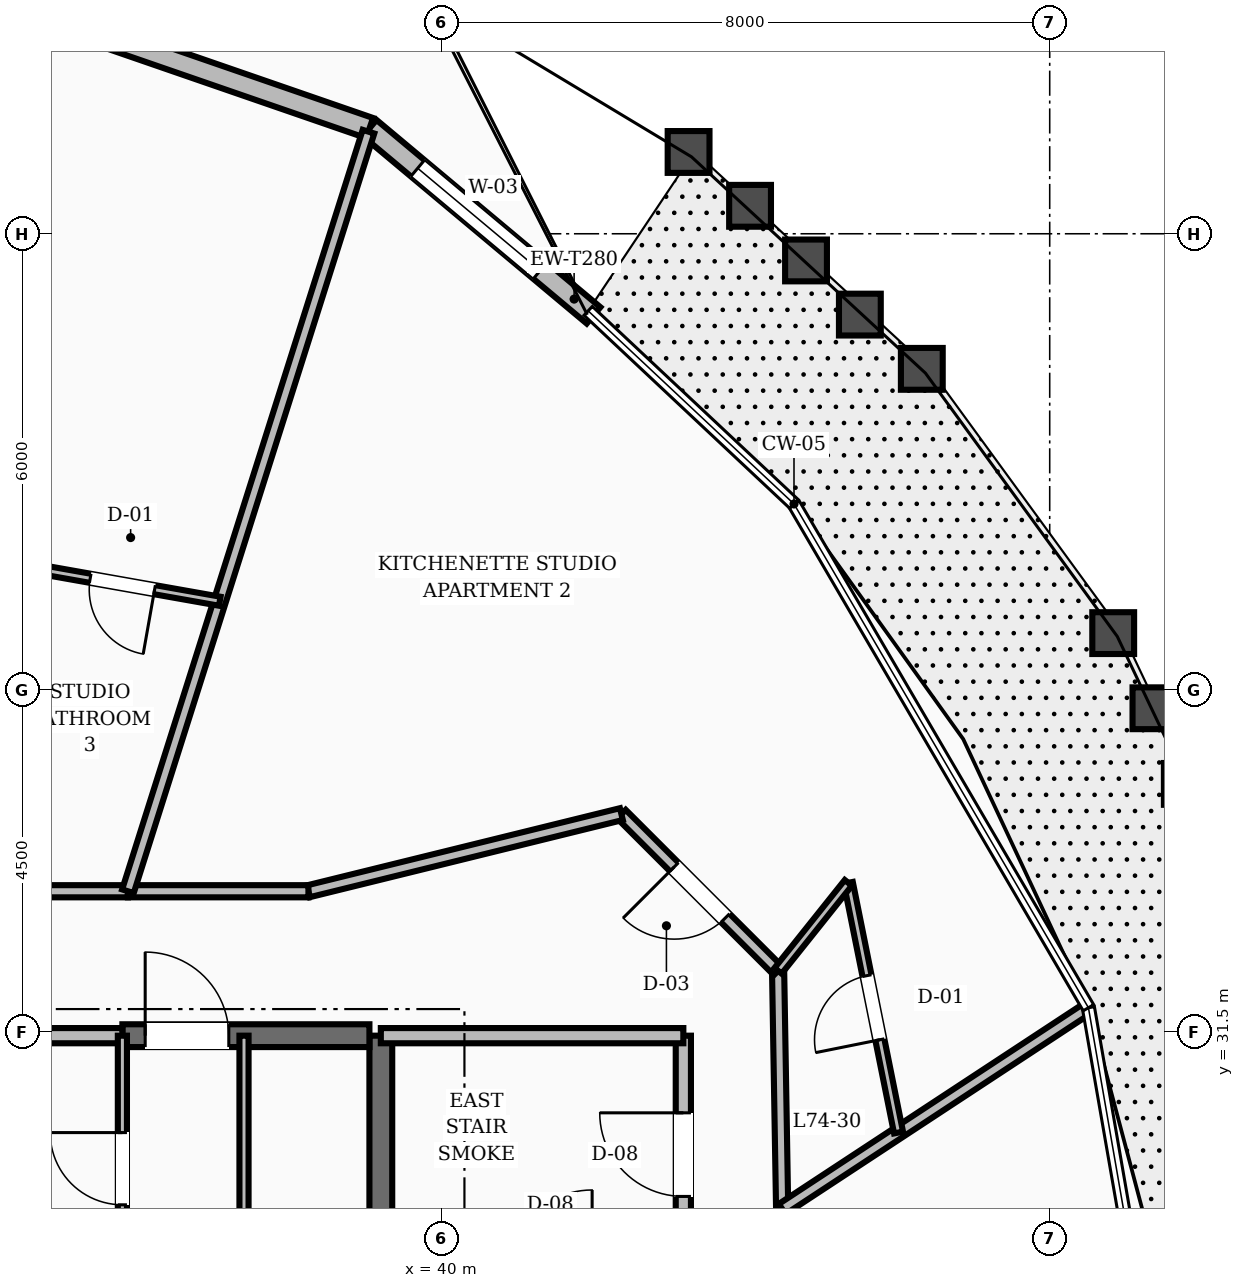
"""IFC4 building model, lengths in metres.
Left out: names, types, materials, properties, quantities, classifications, styles, units other than length and angle.
Written with IfcOpenShell. Run it as: python <this file> out.ifc"""

import sys

from ifc_helpers import new_model, si_unit, direction, frame, frame_2d, origin, place, context, subcontext, project, spatial, rectangle, extrude, element, fill, save


model = new_model("IFC4")
c1 = context("Model", 3, precision=1e-05, world=origin(), true_north=direction((0.0, 1.0)))
c2 = subcontext(c1, "Body", "Model", "MODEL_VIEW")
j1 = project(units=[si_unit("LENGTHUNIT", "METRE"), si_unit("PLANEANGLEUNIT", "RADIAN")], contexts=[c1])
p1 = place(None, origin())
s1 = spatial("IfcSite", under=j1, at=p1, CompositionType="ELEMENT")
p2 = place(p1, origin())
s2 = spatial("IfcBuilding", under=s1, at=p2, CompositionType="ELEMENT")
p3 = place(p2, frame((0.0, 0.0, 283.2)))
s3 = spatial("IfcBuildingStorey", under=s2, at=p3, CompositionType="ELEMENT", Elevation=283.2)
p4 = place(p3, frame((39.2, 25.15, 0.0), z_axis=(0.0, 0.0, 1.0), x_axis=(0.0, 1.0, 0.0)))
e1 = element("IfcWall", 1, at=p4, inside=s3, PredefinedType="SHEAR", context=c2, shape_type="SweptSolid", body=[
    extrude(rectangle(XDim=6.3, YDim=0.3, at=frame_2d((3.15, 0.0))), origin(), (0.0, 0.0, 1.0), 3.6),
])
p5 = place(p3, frame((35.8, 31.45, 0.0), z_axis=(0.0, 0.0, 1.0), x_axis=(1.0, 0.0, 0.0)))
e2 = element("IfcWall", 2, at=p5, inside=s3, PredefinedType="SHEAR", context=c2, shape_type="SweptSolid", body=[
    extrude(rectangle(XDim=3.25, YDim=0.3, at=frame_2d((1.625, 0.0))), origin(), (0.0, 0.0, 1.0), 3.6),
])
p6 = place(p5, frame((0.3, 0.0, 0.0)))
e3 = element("IfcOpeningElement", 3, at=p6, cuts=e2, PredefinedType="OPENING", context=c2, shape_type="SweptSolid", body=[
    extrude(rectangle(XDim=1.1, YDim=2.1, at=frame_2d((0.55, 1.05))), frame((0.0, 0.16, 0.0), z_axis=(0.0, -1.0, 0.0), x_axis=(1.0, 0.0, 0.0)), (0.0, 0.0, 1.0), 0.32),
])
p7 = place(p3, frame((41.999, 40.927, 0.0), z_axis=(0.0, 0.0, 1.0), x_axis=(-0.767031932992, 0.641608925882, 0.0)))
e4 = element("IfcWall", 4, at=p7, inside=s3, PredefinedType="STANDARD", context=c2, shape_type="SweptSolid", body=[
    extrude(rectangle(XDim=3.841, YDim=0.28, at=frame_2d((1.92, 0.0))), origin(), (0.0, 0.0, 1.0), 2.88),
])
p8 = place(p7, frame((0.916, 0.0, 0.8)))
e5 = element("IfcOpeningElement", 5, at=p8, cuts=e4, PredefinedType="OPENING", context=c2, shape_type="SweptSolid", body=[
    extrude(rectangle(XDim=2.1, YDim=1.65, at=frame_2d((1.05, 0.825))), frame((0.0, 0.15, 0.0), z_axis=(0.0, -1.0, 0.0), x_axis=(1.0, 0.0, 0.0)), (0.0, 0.0, 1.0), 0.3),
])
p9 = place(p3, frame((39.053, 43.391, 0.0), z_axis=(0.0, 0.0, 1.0), x_axis=(-0.945189830933, 0.326521336976, 0.0)))
e6 = element("IfcWall", 6, at=p9, inside=s3, PredefinedType="STANDARD", context=c2, shape_type="SweptSolid", body=[
    extrude(rectangle(XDim=3.658, YDim=0.28, at=frame_2d((1.829, 0.0))), origin(), (0.0, 0.0, 1.0), 2.88),
])
p10 = place(p3, frame((43.18, 28.32, 0.0), z_axis=(0.0, 0.0, 1.0), x_axis=(0.0, 1.0, 0.0)))
e7 = element("IfcWall", 7, at=p10, inside=s3, PredefinedType="SOLIDWALL", context=c2, shape_type="SweptSolid", body=[
    extrude(rectangle(XDim=3.13, YDim=0.2, at=frame_2d((1.565, 0.0))), origin(), (0.0, 0.0, 1.0), 2.87),
])
p11 = place(p10, frame((1.015, 0.0, 0.0)))
e8 = element("IfcOpeningElement", 8, at=p11, cuts=e7, PredefinedType="OPENING", context=c2, shape_type="SweptSolid", body=[
    extrude(rectangle(XDim=1.1, YDim=2.1, at=frame_2d((0.55, 1.05))), frame((0.0, 0.11, 0.0), z_axis=(0.0, -1.0, 0.0), x_axis=(1.0, 0.0, 0.0)), (0.0, 0.0, 1.0), 0.22),
])
p12 = place(p3, frame((39.2, 31.45, 0.0), z_axis=(0.0, 0.0, 1.0), x_axis=(1.0, 0.0, 0.0)))
e9 = element("IfcWall", 9, at=p12, inside=s3, PredefinedType="SOLIDWALL", context=c2, shape_type="SweptSolid", body=[
    extrude(rectangle(XDim=3.98, YDim=0.2, at=frame_2d((1.99, 0.0))), origin(), (0.0, 0.0, 1.0), 2.87),
])
p13 = place(p3, frame((28.2, 31.45, 0.0), z_axis=(0.0, 0.0, 1.0), x_axis=(1.0, 0.0, 0.0)))
e10 = element("IfcWall", 10, at=p13, inside=s3, PredefinedType="SOLIDWALL", context=c2, shape_type="SweptSolid", body=[
    extrude(rectangle(XDim=7.6, YDim=0.2, at=frame_2d((3.8, 0.0))), origin(), (0.0, 0.0, 1.0), 2.87),
])
p14 = place(p13, frame((1.0, 0.0, 0.0)))
e11 = element("IfcOpeningElement", 11, at=p14, cuts=e10, PredefinedType="OPENING", context=c2, shape_type="SweptSolid", body=[
    extrude(rectangle(XDim=0.95, YDim=2.1, at=frame_2d((0.475, 1.05))), frame((0.0, 0.11, 0.0), z_axis=(0.0, -1.0, 0.0), x_axis=(1.0, 0.0, 0.0)), (0.0, 0.0, 1.0), 0.22),
])
p15 = place(p3, frame((35.8, 27.95, 0.0), z_axis=(0.0, 0.0, 1.0), x_axis=(0.0, 1.0, 0.0)))
e12 = element("IfcWall", 12, at=p15, inside=s3, PredefinedType="PARTITIONING", context=c2, shape_type="SweptSolid", body=[
    extrude(rectangle(XDim=3.5, YDim=0.12, at=frame_2d((1.75, 0.0))), origin(), (0.0, 0.0, 1.0), 2.87),
])
p16 = place(p15, frame((1.275, 0.0, 0.0)))
e13 = element("IfcOpeningElement", 13, at=p16, cuts=e12, PredefinedType="OPENING", context=c2, shape_type="SweptSolid", body=[
    extrude(rectangle(XDim=0.95, YDim=2.1, at=frame_2d((0.475, 1.05))), frame((0.0, 0.07, 0.0), z_axis=(0.0, -1.0, 0.0), x_axis=(1.0, 0.0, 0.0)), (0.0, 0.0, 1.0), 0.14),
])
p17 = place(p3, frame((37.4, 25.25, 0.0), z_axis=(0.0, 0.0, 1.0), x_axis=(0.0, 1.0, 0.0)))
e14 = element("IfcWall", 14, at=p17, inside=s3, PredefinedType="PARTITIONING", context=c2, shape_type="SweptSolid", body=[
    extrude(rectangle(XDim=6.2, YDim=0.12, at=frame_2d((3.1, 0.0))), origin(), (0.0, 0.0, 1.0), 2.87),
])
p18 = place(p17, frame((2.625, 0.0, 0.0)))
e15 = element("IfcOpeningElement", 15, at=p18, cuts=e14, PredefinedType="OPENING", context=c2, shape_type="SweptSolid", body=[
    extrude(rectangle(XDim=0.95, YDim=2.1, at=frame_2d((0.475, 1.05))), frame((0.0, 0.07, 0.0), z_axis=(0.0, -1.0, 0.0), x_axis=(1.0, 0.0, 0.0)), (0.0, 0.0, 1.0), 0.14),
])
p19 = place(p3, frame((44.48, 29.169, 0.0), z_axis=(0.0, 0.0, 1.0), x_axis=(-0.016981035134, 0.999855811828, 0.0)))
e16 = element("IfcWall", 16, at=p19, inside=s3, PredefinedType="SOLIDWALL", context=c2, shape_type="SweptSolid", body=[
    extrude(rectangle(XDim=3.134, YDim=0.16, at=frame_2d((1.567, 0.0))), origin(), (0.0, 0.0, 1.0), 2.87),
])
p20 = place(p3, frame((44.427, 32.303, 0.0), z_axis=(0.0, 0.0, 1.0), x_axis=(-0.707106781187, 0.707106781187, 0.0)))
e17 = element("IfcWall", 17, at=p20, inside=s3, PredefinedType="SOLIDWALL", context=c2, shape_type="SweptSolid", body=[
    extrude(rectangle(XDim=2.916, YDim=0.16, at=frame_2d((1.458, 0.0))), origin(), (0.0, 0.0, 1.0), 2.87),
])
p21 = place(p20, frame((0.983, 0.0, 0.0)))
e18 = element("IfcOpeningElement", 18, at=p21, cuts=e17, PredefinedType="OPENING", context=c2, shape_type="SweptSolid", body=[
    extrude(rectangle(XDim=0.95, YDim=2.1, at=frame_2d((0.475, 1.05))), frame((0.0, 0.09, 0.0), z_axis=(0.0, -1.0, 0.0), x_axis=(1.0, 0.0, 0.0)), (0.0, 0.0, 1.0), 0.18),
])
p22 = place(p3, frame((42.365, 34.365, 0.0), z_axis=(0.0, 0.0, 1.0), x_axis=(-0.970939799552, -0.239323850978, 0.0)))
e19 = element("IfcWall", 19, at=p22, inside=s3, PredefinedType="SOLIDWALL", context=c2, shape_type="SweptSolid", body=[
    extrude(rectangle(XDim=4.241, YDim=0.16, at=frame_2d((2.12, 0.0))), origin(), (0.0, 0.0, 1.0), 2.87),
])
p23 = place(p3, frame((38.248, 33.35, 0.0), z_axis=(0.0, 0.0, 1.0), x_axis=(-1.0, 0.0, 0.0)))
e20 = element("IfcWall", 20, at=p23, inside=s3, PredefinedType="SOLIDWALL", context=c2, shape_type="SweptSolid", body=[
    extrude(rectangle(XDim=2.375, YDim=0.16, at=frame_2d((1.188, 0.0))), origin(), (0.0, 0.0, 1.0), 2.87),
])
p24 = place(p3, frame((35.873, 33.35, 0.0), z_axis=(0.0, 0.0, 1.0), x_axis=(-1.0, 0.0, 0.0)))
e21 = element("IfcWall", 21, at=p24, inside=s3, PredefinedType="SOLIDWALL", context=c2, shape_type="SweptSolid", body=[
    extrude(rectangle(XDim=2.013, YDim=0.16, at=frame_2d((1.006, 0.0))), origin(), (0.0, 0.0, 1.0), 2.87),
])
p25 = place(p3, frame((44.48, 29.169, 0.0), z_axis=(0.0, 0.0, 1.0), x_axis=(0.835700112482, 0.549186054082, 0.0)))
e22 = element("IfcWall", 22, at=p25, inside=s3, PredefinedType="SOLIDWALL", context=c2, shape_type="SweptSolid", body=[
    extrude(rectangle(XDim=4.772, YDim=0.16, at=frame_2d((2.386, 0.0))), origin(), (0.0, 0.0, 1.0), 2.87),
])
p26 = place(p3, frame((46.011, 30.176, 0.0), z_axis=(0.0, 0.0, 1.0), x_axis=(-0.197152846151, 0.980372763419, 0.0)))
e23 = element("IfcWall", 23, at=p26, inside=s3, PredefinedType="PARTITIONING", context=c2, shape_type="SweptSolid", body=[
    extrude(rectangle(XDim=3.351, YDim=0.12, at=frame_2d((1.675, 0.0))), origin(), (0.0, 0.0, 1.0), 2.87),
])
p27 = place(p26, frame((1.246, 0.0, 0.0)))
e24 = element("IfcOpeningElement", 24, at=p27, cuts=e23, PredefinedType="OPENING", context=c2, shape_type="SweptSolid", body=[
    extrude(rectangle(XDim=0.86, YDim=2.1, at=frame_2d((0.43, 1.05))), frame((0.0, 0.07, 0.0), z_axis=(0.0, -1.0, 0.0), x_axis=(1.0, 0.0, 0.0)), (0.0, 0.0, 1.0), 0.14),
])
p28 = place(p3, frame((44.427, 32.303, 0.0), z_axis=(0.0, 0.0, 1.0), x_axis=(0.623729692051, 0.781640116201, 0.0)))
e25 = element("IfcWall", 25, at=p28, inside=s3, PredefinedType="PARTITIONING", context=c2, shape_type="SweptSolid", body=[
    extrude(rectangle(XDim=1.481, YDim=0.12, at=frame_2d((0.741, 0.0))), origin(), (0.0, 0.0, 1.0), 2.87),
])
p29 = place(p3, frame((35.873, 33.35, 0.0), z_axis=(0.0, 0.0, 1.0), x_axis=(0.301923810038, 0.953332058064, 0.0)))
e26 = element("IfcWall", 26, at=p29, inside=s3, PredefinedType="SOLIDWALL", context=c2, shape_type="SweptSolid", body=[
    extrude(rectangle(XDim=10.482, YDim=0.16, at=frame_2d((5.241, 0.0))), origin(), (0.0, 0.0, 1.0), 2.87),
])
p30 = place(p3, frame((37.081, 37.166, 0.0), z_axis=(0.0, 0.0, 1.0), x_axis=(-0.984669047574, 0.174432986415, 0.0)))
e27 = element("IfcWall", 27, at=p30, inside=s3, PredefinedType="PARTITIONING", context=c2, shape_type="SweptSolid", body=[
    extrude(rectangle(XDim=2.602, YDim=0.12, at=frame_2d((1.301, 0.0))), origin(), (0.0, 0.0, 1.0), 2.87),
])
p31 = place(p30, frame((0.871, 0.0, 0.0)))
e28 = element("IfcOpeningElement", 28, at=p31, cuts=e27, PredefinedType="OPENING", context=c2, shape_type="SweptSolid", body=[
    extrude(rectangle(XDim=0.86, YDim=2.1, at=frame_2d((0.43, 1.05))), frame((0.0, 0.07, 0.0), z_axis=(0.0, -1.0, 0.0), x_axis=(1.0, 0.0, 0.0)), (0.0, 0.0, 1.0), 0.14),
])
p32 = place(p8, origin())
e29 = element("IfcWindow", 29, at=p32, inside=s3, PartitioningType="SINGLE_PANEL", PredefinedType="WINDOW", context=c2, shape_type="SweptSolid", body=[
    extrude(rectangle(XDim=2.1, YDim=1.65, at=frame_2d((1.05, 0.825))), frame((0.0, 0.03, 0.0), z_axis=(0.0, -1.0, 0.0), x_axis=(1.0, 0.0, 0.0)), (0.0, 0.0, 1.0), 0.06),
])
fill(e5, e29)
p33 = place(p11, origin())
e30 = element("IfcDoor", 30, at=p33, inside=s3, OperationType="SINGLE_SWING_RIGHT", PredefinedType="DOOR", context=c2, shape_type="SweptSolid", body=[
    extrude(rectangle(XDim=1.1, YDim=2.1, at=frame_2d((0.55, 1.05))), frame((0.0, 0.025, 0.0), z_axis=(0.0, -1.0, 0.0), x_axis=(1.0, 0.0, 0.0)), (0.0, 0.0, 1.0), 0.05),
])
fill(e8, e30)
p34 = place(p6, origin())
e31 = element("IfcDoor", 31, at=p34, inside=s3, OperationType="SINGLE_SWING_LEFT", PredefinedType="DOOR", context=c2, shape_type="SweptSolid", body=[
    extrude(rectangle(XDim=1.1, YDim=2.1, at=frame_2d((0.55, 1.05))), frame((0.0, 0.025, 0.0), z_axis=(0.0, -1.0, 0.0), x_axis=(1.0, 0.0, 0.0)), (0.0, 0.0, 1.0), 0.05),
])
fill(e3, e31)
p35 = place(p16, origin())
e32 = element("IfcDoor", 32, at=p35, inside=s3, OperationType="SINGLE_SWING_RIGHT", PredefinedType="DOOR", context=c2, shape_type="SweptSolid", body=[
    extrude(rectangle(XDim=0.95, YDim=2.1, at=frame_2d((0.475, 1.05))), frame((0.0, 0.025, 0.0), z_axis=(0.0, -1.0, 0.0), x_axis=(1.0, 0.0, 0.0)), (0.0, 0.0, 1.0), 0.05),
])
fill(e13, e32)
p36 = place(p27, origin())
e33 = element("IfcDoor", 33, at=p36, inside=s3, OperationType="SINGLE_SWING_LEFT", PredefinedType="DOOR", context=c2, shape_type="SweptSolid", body=[
    extrude(rectangle(XDim=0.86, YDim=2.1, at=frame_2d((0.43, 1.05))), frame((0.0, 0.025, 0.0), z_axis=(0.0, -1.0, 0.0), x_axis=(1.0, 0.0, 0.0)), (0.0, 0.0, 1.0), 0.05),
])
fill(e24, e33)
p37 = place(p21, origin())
e34 = element("IfcDoor", 34, at=p37, inside=s3, OperationType="SINGLE_SWING_RIGHT", PredefinedType="DOOR", context=c2, shape_type="SweptSolid", body=[
    extrude(rectangle(XDim=0.95, YDim=2.1, at=frame_2d((0.475, 1.05))), frame((0.0, 0.025, 0.0), z_axis=(0.0, -1.0, 0.0), x_axis=(1.0, 0.0, 0.0)), (0.0, 0.0, 1.0), 0.05),
])
fill(e18, e34)
p38 = place(p31, origin())
e35 = element("IfcDoor", 35, at=p38, inside=s3, OperationType="SINGLE_SWING_LEFT", PredefinedType="DOOR", context=c2, shape_type="SweptSolid", body=[
    extrude(rectangle(XDim=0.86, YDim=2.1, at=frame_2d((0.43, 1.05))), frame((0.0, 0.025, 0.0), z_axis=(0.0, -1.0, 0.0), x_axis=(1.0, 0.0, 0.0)), (0.0, 0.0, 1.0), 0.05),
])
fill(e28, e35)
save(model, sys.argv[1])
